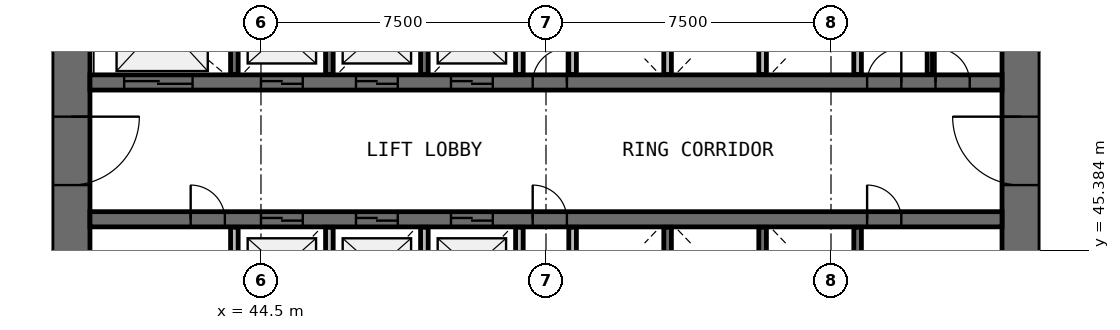
"""IFC4 building model, lengths in metres.
Left out: names, types, materials, properties, quantities, classifications, styles, units other than length and angle.
Written with IfcOpenShell. Run it as: python <this file> out.ifc"""

import sys

from ifc_helpers import new_model, si_unit, direction, frame, frame_2d, origin, place, context, subcontext, project, spatial, rectangle, extrude, source, transform, mapped, element, fill, save


model = new_model("IFC4")
c1 = context("Model", 3, precision=1e-05, world=origin(), true_north=direction((0.0, 1.0)))
c2 = subcontext(c1, "Body", "Model", "MODEL_VIEW")
j1 = project(units=[si_unit("LENGTHUNIT", "METRE"), si_unit("PLANEANGLEUNIT", "RADIAN")], contexts=[c1])
p1 = place(None, origin())
s1 = spatial("IfcSite", under=j1, at=p1, CompositionType="ELEMENT")
p2 = place(p1, origin())
s2 = spatial("IfcBuilding", under=s1, at=p2, CompositionType="ELEMENT")
p3 = place(p2, frame((0.0, 0.0, 13.8)))
s3 = spatial("IfcBuildingStorey", under=s2, at=p3, CompositionType="ELEMENT", Elevation=13.8)
p4 = place(p3, frame((64.5, 38.0, 0.0), z_axis=(0.0, 0.0, 1.0), x_axis=(0.0, 1.0, 0.0)))
e1 = element("IfcWall", 1, at=p4, inside=s3, PredefinedType="SHEAR", context=c2, shape_type="SweptSolid", body=[
    extrude(rectangle(XDim=20.0, YDim=1.0, at=frame_2d((10.0, 0.0))), origin(), (0.0, 0.0, 1.0), 4.4),
])
p5 = place(p4, frame((9.1, 0.0, 0.0)))
e2 = element("IfcOpeningElement", 2, at=p5, cuts=e1, PredefinedType="OPENING", context=c2, shape_type="SweptSolid", body=[
    extrude(rectangle(XDim=1.8, YDim=2.1, at=frame_2d((0.9, 1.05))), frame((0.0, 0.51, 0.0), z_axis=(0.0, -1.0, 0.0), x_axis=(1.0, 0.0, 0.0)), (0.0, 0.0, 1.0), 1.02),
])
p6 = place(p3, frame((39.5, 58.0, 0.0), z_axis=(0.0, 0.0, 1.0), x_axis=(0.0, -1.0, 0.0)))
e3 = element("IfcWall", 3, at=p6, inside=s3, PredefinedType="SHEAR", context=c2, shape_type="SweptSolid", body=[
    extrude(rectangle(XDim=20.0, YDim=1.0, at=frame_2d((10.0, 0.0))), origin(), (0.0, 0.0, 1.0), 4.4),
])
p7 = place(p6, frame((9.1, 0.0, 0.0)))
e4 = element("IfcOpeningElement", 4, at=p7, cuts=e3, PredefinedType="OPENING", context=c2, shape_type="SweptSolid", body=[
    extrude(rectangle(XDim=1.8, YDim=2.1, at=frame_2d((0.9, 1.05))), frame((0.0, 0.51, 0.0), z_axis=(0.0, -1.0, 0.0), x_axis=(1.0, 0.0, 0.0)), (0.0, 0.0, 1.0), 1.02),
])
p8 = place(p3, frame((40.0, 49.8, 0.0), z_axis=(0.0, 0.0, 1.0), x_axis=(1.0, 0.0, 0.0)))
e5 = element("IfcWall", 5, at=p8, inside=s3, PredefinedType="SHEAR", context=c2, shape_type="SweptSolid", body=[
    extrude(rectangle(XDim=24.0, YDim=0.4, at=frame_2d((12.0, 0.0))), origin(), (0.0, 0.0, 1.0), 4.4),
])
p9 = place(p8, frame((4.5, 0.0, 0.0)))
e6 = element("IfcOpeningElement", 6, at=p9, cuts=e5, PredefinedType="OPENING", context=c2, shape_type="SweptSolid", body=[
    extrude(rectangle(XDim=1.1, YDim=2.1, at=frame_2d((0.55, 1.05))), frame((0.0, 0.21, 0.0), z_axis=(0.0, -1.0, 0.0), x_axis=(1.0, 0.0, 0.0)), (0.0, 0.0, 1.0), 0.42),
])
p10 = place(p8, frame((7.0, 0.0, 0.0)))
e7 = element("IfcOpeningElement", 7, at=p10, cuts=e5, PredefinedType="OPENING", context=c2, shape_type="SweptSolid", body=[
    extrude(rectangle(XDim=1.1, YDim=2.1, at=frame_2d((0.55, 1.05))), frame((0.0, 0.21, 0.0), z_axis=(0.0, -1.0, 0.0), x_axis=(1.0, 0.0, 0.0)), (0.0, 0.0, 1.0), 0.42),
])
p11 = place(p8, frame((9.5, 0.0, 0.0)))
e8 = element("IfcOpeningElement", 8, at=p11, cuts=e5, PredefinedType="OPENING", context=c2, shape_type="SweptSolid", body=[
    extrude(rectangle(XDim=1.1, YDim=2.1, at=frame_2d((0.55, 1.05))), frame((0.0, 0.21, 0.0), z_axis=(0.0, -1.0, 0.0), x_axis=(1.0, 0.0, 0.0)), (0.0, 0.0, 1.0), 0.42),
])
p12 = place(p8, frame((0.9, 0.0, 0.0)))
e9 = element("IfcOpeningElement", 9, at=p12, cuts=e5, PredefinedType="OPENING", context=c2, shape_type="SweptSolid", body=[
    extrude(rectangle(XDim=1.8, YDim=2.4, at=frame_2d((0.9, 1.2))), frame((0.0, 0.21, 0.0), z_axis=(0.0, -1.0, 0.0), x_axis=(1.0, 0.0, 0.0)), (0.0, 0.0, 1.0), 0.42),
])
p13 = place(p8, frame((20.45, 0.0, 0.0)))
e10 = element("IfcOpeningElement", 10, at=p13, cuts=e5, PredefinedType="OPENING", context=c2, shape_type="SweptSolid", body=[
    extrude(rectangle(XDim=0.9, YDim=2.1, at=frame_2d((0.45, 1.05))), frame((0.0, 0.21, 0.0), z_axis=(0.0, -1.0, 0.0), x_axis=(1.0, 0.0, 0.0)), (0.0, 0.0, 1.0), 0.42),
])
p14 = place(p8, frame((22.25, 0.0, 0.0)))
e11 = element("IfcOpeningElement", 11, at=p14, cuts=e5, PredefinedType="OPENING", context=c2, shape_type="SweptSolid", body=[
    extrude(rectangle(XDim=0.9, YDim=2.1, at=frame_2d((0.45, 1.05))), frame((0.0, 0.21, 0.0), z_axis=(0.0, -1.0, 0.0), x_axis=(1.0, 0.0, 0.0)), (0.0, 0.0, 1.0), 0.42),
])
p15 = place(p8, frame((11.65, 0.0, 0.0)))
e12 = element("IfcOpeningElement", 12, at=p15, cuts=e5, PredefinedType="OPENING", context=c2, shape_type="SweptSolid", body=[
    extrude(rectangle(XDim=0.9, YDim=2.1, at=frame_2d((0.45, 1.05))), frame((0.0, 0.21, 0.0), z_axis=(0.0, -1.0, 0.0), x_axis=(1.0, 0.0, 0.0)), (0.0, 0.0, 1.0), 0.42),
])
p16 = place(p3, frame((40.0, 46.2, 0.0), z_axis=(0.0, 0.0, 1.0), x_axis=(1.0, 0.0, 0.0)))
e13 = element("IfcWall", 13, at=p16, inside=s3, PredefinedType="SHEAR", context=c2, shape_type="SweptSolid", body=[
    extrude(rectangle(XDim=24.0, YDim=0.4, at=frame_2d((12.0, 0.0))), origin(), (0.0, 0.0, 1.0), 4.4),
])
p17 = place(p16, frame((4.5, 0.0, 0.0)))
e14 = element("IfcOpeningElement", 14, at=p17, cuts=e13, PredefinedType="OPENING", context=c2, shape_type="SweptSolid", body=[
    extrude(rectangle(XDim=1.1, YDim=2.1, at=frame_2d((0.55, 1.05))), frame((0.0, 0.21, 0.0), z_axis=(0.0, -1.0, 0.0), x_axis=(1.0, 0.0, 0.0)), (0.0, 0.0, 1.0), 0.42),
])
p18 = place(p16, frame((7.0, 0.0, 0.0)))
e15 = element("IfcOpeningElement", 15, at=p18, cuts=e13, PredefinedType="OPENING", context=c2, shape_type="SweptSolid", body=[
    extrude(rectangle(XDim=1.1, YDim=2.1, at=frame_2d((0.55, 1.05))), frame((0.0, 0.21, 0.0), z_axis=(0.0, -1.0, 0.0), x_axis=(1.0, 0.0, 0.0)), (0.0, 0.0, 1.0), 0.42),
])
p19 = place(p16, frame((9.5, 0.0, 0.0)))
e16 = element("IfcOpeningElement", 16, at=p19, cuts=e13, PredefinedType="OPENING", context=c2, shape_type="SweptSolid", body=[
    extrude(rectangle(XDim=1.1, YDim=2.1, at=frame_2d((0.55, 1.05))), frame((0.0, 0.21, 0.0), z_axis=(0.0, -1.0, 0.0), x_axis=(1.0, 0.0, 0.0)), (0.0, 0.0, 1.0), 0.42),
])
p20 = place(p16, frame((20.45, 0.0, 0.0)))
e17 = element("IfcOpeningElement", 17, at=p20, cuts=e13, PredefinedType="OPENING", context=c2, shape_type="SweptSolid", body=[
    extrude(rectangle(XDim=0.9, YDim=2.1, at=frame_2d((0.45, 1.05))), frame((0.0, 0.21, 0.0), z_axis=(0.0, -1.0, 0.0), x_axis=(1.0, 0.0, 0.0)), (0.0, 0.0, 1.0), 0.42),
])
p21 = place(p16, frame((2.65, 0.0, 0.0)))
e18 = element("IfcOpeningElement", 18, at=p21, cuts=e13, PredefinedType="OPENING", context=c2, shape_type="SweptSolid", body=[
    extrude(rectangle(XDim=0.9, YDim=2.1, at=frame_2d((0.45, 1.05))), frame((0.0, 0.21, 0.0), z_axis=(0.0, -1.0, 0.0), x_axis=(1.0, 0.0, 0.0)), (0.0, 0.0, 1.0), 0.42),
])
p22 = place(p16, frame((11.65, 0.0, 0.0)))
e19 = element("IfcOpeningElement", 19, at=p22, cuts=e13, PredefinedType="OPENING", context=c2, shape_type="SweptSolid", body=[
    extrude(rectangle(XDim=0.9, YDim=2.1, at=frame_2d((0.45, 1.05))), frame((0.0, 0.21, 0.0), z_axis=(0.0, -1.0, 0.0), x_axis=(1.0, 0.0, 0.0)), (0.0, 0.0, 1.0), 0.42),
])
for number, where, z_axis, x_axis in (
    (20, (43.8, 45.99, 0.0), (0.0, 0.0, 1.0), (0.0, -1.0, 0.0)),
    (21, (43.8, 52.37, 0.0), (0.0, 0.0, 1.0), (0.0, -1.0, 0.0)),
):
    element("IfcWall", number, at=place(p3, frame(where, z_axis=z_axis, x_axis=x_axis)), inside=s3, PredefinedType="SOLIDWALL", context=c2, shape_type="SweptSolid", body=[
        extrude(rectangle(XDim=2.36, YDim=0.2, at=frame_2d((1.18, 0.0))), origin(), (0.0, 0.0, 1.0), 4.05),
    ])
p23 = place(p3, frame((46.3, 43.6, 0.0), z_axis=(0.0, 0.0, 1.0), x_axis=(0.0, 1.0, 0.0)))
e22 = element("IfcWall", 22, at=p23, inside=s3, PredefinedType="SOLIDWALL", context=c2, shape_type="SweptSolid", body=[
    extrude(rectangle(XDim=2.39, YDim=0.2, at=frame_2d((1.195, 0.0))), origin(), (0.0, 0.0, 1.0), 4.05),
])
for number, where, z_axis, x_axis in (
    (23, (46.3, 50.01, 0.0), (0.0, 0.0, 1.0), (0.0, 1.0, 0.0)),
    (24, (48.8, 43.63, 0.0), (0.0, 0.0, 1.0), (0.0, 1.0, 0.0)),
    (25, (48.8, 50.01, 0.0), (0.0, 0.0, 1.0), (0.0, 1.0, 0.0)),
    (26, (51.3, 43.63, 0.0), (0.0, 0.0, 1.0), (0.0, 1.0, 0.0)),
):
    element("IfcWall", number, at=place(p3, frame(where, z_axis=z_axis, x_axis=x_axis)), inside=s3, PredefinedType="SOLIDWALL", context=c2, shape_type="SweptSolid", body=[
        extrude(rectangle(XDim=2.36, YDim=0.2, at=frame_2d((1.18, 0.0))), origin(), (0.0, 0.0, 1.0), 4.05),
    ])
for number, where, z_axis, x_axis in (
    (27, (51.3, 50.01, 0.0), (0.0, 0.0, 1.0), (0.0, 1.0, 0.0)),
    (28, (52.7, 45.99, 0.0), (0.0, 0.0, 1.0), (0.0, -1.0, 0.0)),
):
    element("IfcWall", number, at=place(p3, frame(where, z_axis=z_axis, x_axis=x_axis)), inside=s3, PredefinedType="SOLIDWALL", context=c2, shape_type="SweptSolid", body=[
        extrude(rectangle(XDim=2.39, YDim=0.2, at=frame_2d((1.195, 0.0))), origin(), (0.0, 0.0, 1.0), 4.05),
    ])
for number, where, z_axis, x_axis in (
    (29, (52.7, 52.37, 0.0), (0.0, 0.0, 1.0), (0.0, -1.0, 0.0)),
    (30, (55.2, 43.63, 0.0), (0.0, 0.0, 1.0), (0.0, 1.0, 0.0)),
    (31, (55.2, 50.01, 0.0), (0.0, 0.0, 1.0), (0.0, 1.0, 0.0)),
    (32, (57.7, 43.63, 0.0), (0.0, 0.0, 1.0), (0.0, 1.0, 0.0)),
):
    element("IfcWall", number, at=place(p3, frame(where, z_axis=z_axis, x_axis=x_axis)), inside=s3, PredefinedType="SOLIDWALL", context=c2, shape_type="SweptSolid", body=[
        extrude(rectangle(XDim=2.36, YDim=0.2, at=frame_2d((1.18, 0.0))), origin(), (0.0, 0.0, 1.0), 4.05),
    ])
p24 = place(p3, frame((57.7, 50.01, 0.0), z_axis=(0.0, 0.0, 1.0), x_axis=(0.0, 1.0, 0.0)))
e33 = element("IfcWall", 33, at=p24, inside=s3, PredefinedType="SOLIDWALL", context=c2, shape_type="SweptSolid", body=[
    extrude(rectangle(XDim=2.39, YDim=0.2, at=frame_2d((1.195, 0.0))), origin(), (0.0, 0.0, 1.0), 4.05),
])
for number, where, z_axis, x_axis in (
    (34, (60.2, 43.63, 0.0), (0.0, 0.0, 1.0), (0.0, 1.0, 0.0)),
    (35, (60.2, 50.01, 0.0), (0.0, 0.0, 1.0), (0.0, 1.0, 0.0)),
):
    element("IfcWall", number, at=place(p3, frame(where, z_axis=z_axis, x_axis=x_axis)), inside=s3, PredefinedType="SOLIDWALL", context=c2, shape_type="SweptSolid", body=[
        extrude(rectangle(XDim=2.36, YDim=0.2, at=frame_2d((1.18, 0.0))), origin(), (0.0, 0.0, 1.0), 4.05),
    ])
p25 = place(p3, frame((62.1, 50.01, 0.0), z_axis=(0.0, 0.0, 1.0), x_axis=(0.0, 1.0, 0.0)))
e36 = element("IfcWall", 36, at=p25, inside=s3, PredefinedType="PARTITIONING", context=c2, shape_type="SweptSolid", body=[
    extrude(rectangle(XDim=2.39, YDim=0.14, at=frame_2d((1.195, 0.0))), origin(), (0.0, 0.0, 1.0), 3.25),
])
m1 = source(origin(), c2, "Body", "SweptSolid", [
    extrude(rectangle(XDim=1.8, YDim=2.1, at=frame_2d((0.9, 1.05))), frame((0.0, 0.025, 0.0), z_axis=(0.0, -1.0, 0.0), x_axis=(1.0, 0.0, 0.0)), (0.0, 0.0, 1.0), 0.05),
])
p26 = place(p7, origin())
e37 = element("IfcDoor", 37, at=p26, inside=s3, OperationType="SINGLE_SWING_LEFT", PredefinedType="DOOR", context=c2, shape_type="MappedRepresentation", body=[
    mapped(m1, transform((0.0, 0.0, 0.0), scale=1.0)),
])
fill(e4, e37)
p27 = place(p5, origin())
e38 = element("IfcDoor", 38, at=p27, inside=s3, OperationType="SINGLE_SWING_RIGHT", PredefinedType="DOOR", context=c2, shape_type="MappedRepresentation", body=[
    mapped(m1, transform((0.0, 0.0, 0.0), scale=1.0)),
])
fill(e2, e38)
m2 = source(origin(), c2, "Body", "SweptSolid", [
    extrude(rectangle(XDim=1.1, YDim=2.1, at=frame_2d((0.55, 1.05))), frame((0.0, 0.025, 0.0), z_axis=(0.0, -1.0, 0.0), x_axis=(1.0, 0.0, 0.0)), (0.0, 0.0, 1.0), 0.05),
])
p28 = place(p9, origin())
e39 = element("IfcDoor", 39, at=p28, inside=s3, OperationType="DOUBLE_DOOR_SLIDING", PredefinedType="USERDEFINED", context=c2, shape_type="MappedRepresentation", body=[
    mapped(m2, transform((0.0, 0.0, 0.0), scale=1.0)),
])
fill(e6, e39)
p29 = place(p10, origin())
e40 = element("IfcDoor", 40, at=p29, inside=s3, OperationType="DOUBLE_DOOR_SLIDING", PredefinedType="USERDEFINED", context=c2, shape_type="MappedRepresentation", body=[
    mapped(m2, transform((0.0, 0.0, 0.0), scale=1.0)),
])
fill(e7, e40)
p30 = place(p11, origin())
e41 = element("IfcDoor", 41, at=p30, inside=s3, OperationType="DOUBLE_DOOR_SLIDING", PredefinedType="USERDEFINED", context=c2, shape_type="MappedRepresentation", body=[
    mapped(m2, transform((0.0, 0.0, 0.0), scale=1.0)),
])
fill(e8, e41)
p31 = place(p17, origin())
e42 = element("IfcDoor", 42, at=p31, inside=s3, OperationType="DOUBLE_DOOR_SLIDING", PredefinedType="USERDEFINED", context=c2, shape_type="MappedRepresentation", body=[
    mapped(m2, transform((0.0, 0.0, 0.0), scale=1.0)),
])
fill(e14, e42)
p32 = place(p18, origin())
e43 = element("IfcDoor", 43, at=p32, inside=s3, OperationType="DOUBLE_DOOR_SLIDING", PredefinedType="USERDEFINED", context=c2, shape_type="MappedRepresentation", body=[
    mapped(m2, transform((0.0, 0.0, 0.0), scale=1.0)),
])
fill(e15, e43)
p33 = place(p19, origin())
e44 = element("IfcDoor", 44, at=p33, inside=s3, OperationType="DOUBLE_DOOR_SLIDING", PredefinedType="USERDEFINED", context=c2, shape_type="MappedRepresentation", body=[
    mapped(m2, transform((0.0, 0.0, 0.0), scale=1.0)),
])
fill(e16, e44)
m3 = source(origin(), c2, "Body", "SweptSolid", [
    extrude(rectangle(XDim=1.8, YDim=2.4, at=frame_2d((0.9, 1.2))), frame((0.0, 0.025, 0.0), z_axis=(0.0, -1.0, 0.0), x_axis=(1.0, 0.0, 0.0)), (0.0, 0.0, 1.0), 0.05),
])
p34 = place(p12, origin())
e45 = element("IfcDoor", 45, at=p34, inside=s3, OperationType="DOUBLE_DOOR_SLIDING", PredefinedType="USERDEFINED", context=c2, shape_type="MappedRepresentation", body=[
    mapped(m3, transform((0.0, 0.0, 0.0), scale=1.0)),
])
fill(e9, e45)
m4 = source(origin(), c2, "Body", "SweptSolid", [
    extrude(rectangle(XDim=0.9, YDim=2.1, at=frame_2d((0.45, 1.05))), frame((0.0, 0.025, 0.0), z_axis=(0.0, -1.0, 0.0), x_axis=(1.0, 0.0, 0.0)), (0.0, 0.0, 1.0), 0.05),
])
p35 = place(p20, origin())
e46 = element("IfcDoor", 46, at=p35, inside=s3, OperationType="SINGLE_SWING_LEFT", PredefinedType="DOOR", context=c2, shape_type="MappedRepresentation", body=[
    mapped(m4, transform((0.0, 0.0, 0.0), scale=1.0)),
])
fill(e17, e46)
p36 = place(p13, origin())
e47 = element("IfcDoor", 47, at=p36, inside=s3, OperationType="SINGLE_SWING_RIGHT", PredefinedType="DOOR", context=c2, shape_type="MappedRepresentation", body=[
    mapped(m4, transform((0.0, 0.0, 0.0), scale=1.0)),
])
fill(e10, e47)
p37 = place(p14, origin())
e48 = element("IfcDoor", 48, at=p37, inside=s3, OperationType="SINGLE_SWING_LEFT", PredefinedType="DOOR", context=c2, shape_type="MappedRepresentation", body=[
    mapped(m4, transform((0.0, 0.0, 0.0), scale=1.0)),
])
fill(e11, e48)
p38 = place(p21, origin())
e49 = element("IfcDoor", 49, at=p38, inside=s3, OperationType="SINGLE_SWING_LEFT", PredefinedType="DOOR", context=c2, shape_type="MappedRepresentation", body=[
    mapped(m4, transform((0.0, 0.0, 0.0), scale=1.0)),
])
fill(e18, e49)
p39 = place(p15, origin())
e50 = element("IfcDoor", 50, at=p39, inside=s3, OperationType="SINGLE_SWING_RIGHT", PredefinedType="DOOR", context=c2, shape_type="MappedRepresentation", body=[
    mapped(m4, transform((0.0, 0.0, 0.0), scale=1.0)),
])
fill(e12, e50)
p40 = place(p22, origin())
e51 = element("IfcDoor", 51, at=p40, inside=s3, OperationType="SINGLE_SWING_LEFT", PredefinedType="DOOR", context=c2, shape_type="MappedRepresentation", body=[
    mapped(m4, transform((0.0, 0.0, 0.0), scale=1.0)),
])
fill(e19, e51)
save(model, sys.argv[1])
